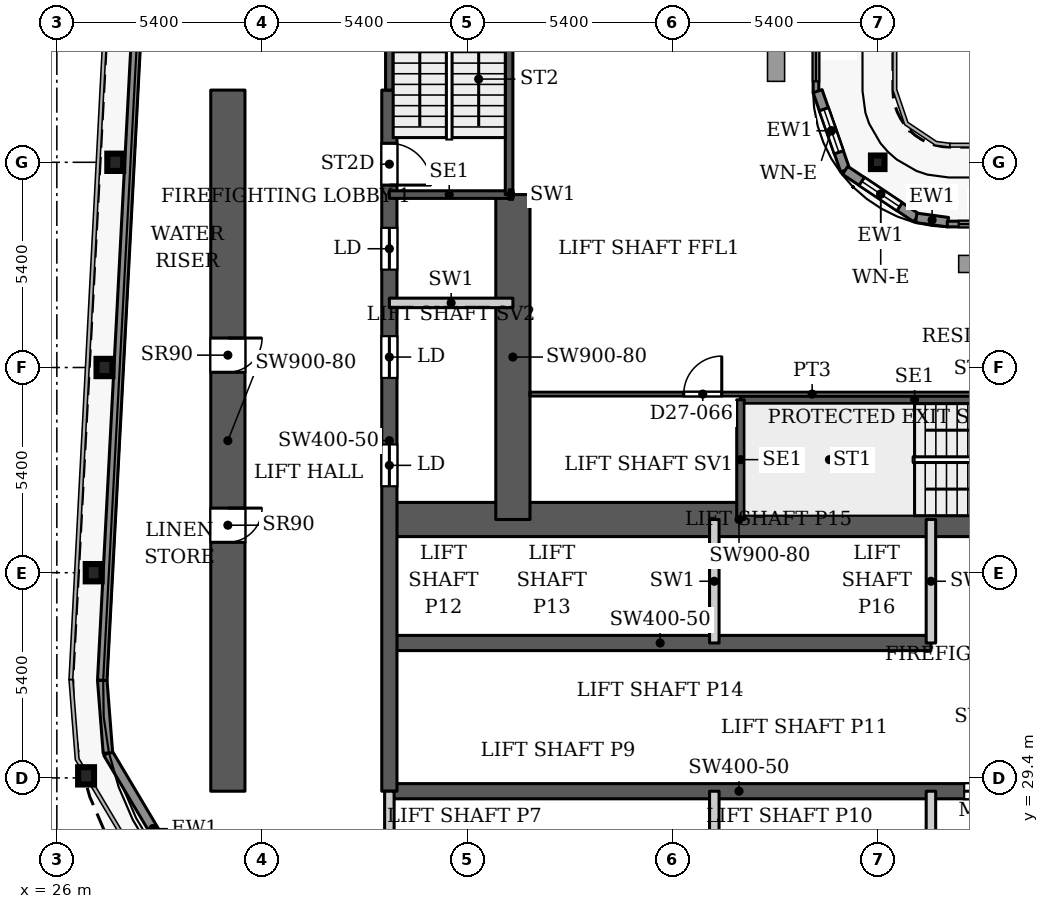
"""IFC4 building model, lengths in metres.
Left out: names, types, materials, properties, quantities, classifications, styles, units other than length and angle.
Written with IfcOpenShell. Run it as: python <this file> out.ifc"""

import sys

from ifc_helpers import new_model, si_unit, direction, frame, frame_2d, origin, origin_2d, place, context, subcontext, project, spatial, rectangle, hollow_rectangle, i_section, extrude, source, transform, mapped, element, fill, save


model = new_model("IFC4")
c1 = context("Model", 3, precision=1e-05, world=origin(), true_north=direction((0.0, 1.0)))
c2 = subcontext(c1, "Body", "Model", "MODEL_VIEW")
j1 = project(units=[si_unit("LENGTHUNIT", "METRE"), si_unit("PLANEANGLEUNIT", "RADIAN")], contexts=[c1])
p1 = place(None, origin())
s1 = spatial("IfcSite", under=j1, at=p1, CompositionType="ELEMENT")
p2 = place(p1, origin())
s2 = spatial("IfcBuilding", under=s1, at=p2, CompositionType="ELEMENT")
p3 = place(p2, frame((0.0, 0.0, 117.5)))
s3 = spatial("IfcBuildingStorey", under=s2, at=p3, CompositionType="ELEMENT", Elevation=117.5)
for number, where, z_axis, x_axis in (
    (1, (26.769, 29.454, 0.0), (0.0, 0.0, 1.0), (1.0, 0.0, 0.0)),
    (2, (26.969, 34.8, 0.0), (0.0, 0.0, 1.0), (1.0, 0.0, 0.0)),
    (3, (27.253, 40.2, 0.0), (0.0, 0.0, 1.0), (1.0, 0.0, 0.0)),
    (4, (27.537, 45.6, 0.0), (0.0, 0.0, 1.0), (1.0, 0.0, 0.0)),
):
    element("IfcColumn", number, at=place(p3, frame(where, z_axis=z_axis, x_axis=x_axis)), inside=s3, PredefinedType="COLUMN", context=c2, shape_type="SweptSolid", body=[
        extrude(i_section(OverallWidth=0.418, OverallDepth=0.455, WebThickness=0.042, FlangeThickness=0.068, FilletRadius=0.014, at=origin_2d()), origin(), (0.0, 0.0, 1.0), 3.9),
    ])
p4 = place(p3, frame((47.6, 45.6, 0.0), z_axis=(0.0, 0.0, 1.0), x_axis=(1.0, 0.0, 0.0)))
e5 = element("IfcColumn", 5, at=p4, inside=s3, PredefinedType="COLUMN", context=c2, shape_type="SweptSolid", body=[
    extrude(hollow_rectangle(XDim=0.356, YDim=0.356, WallThickness=0.016, InnerFilletRadius=0.016, OuterFilletRadius=0.032, at=origin_2d()), origin(), (0.0, 0.0, 1.0), 3.9),
])
p5 = place(p3, frame((34.75, 29.05, 0.0), z_axis=(0.0, 0.0, 1.0), x_axis=(1.0, 0.0, 0.0)))
e6 = element("IfcWall", 6, at=p5, inside=s3, PredefinedType="SHEAR", context=c2, shape_type="SweptSolid", body=[
    extrude(rectangle(XDim=18.4, YDim=0.4, at=frame_2d((9.2, 0.0))), origin(), (0.0, 0.0, 1.0), 3.9),
])
p6 = place(p5, frame((15.125, 0.0, 0.0)))
e7 = element("IfcOpeningElement", 7, at=p6, cuts=e6, PredefinedType="OPENING", context=c2, shape_type="SweptSolid", body=[
    extrude(rectangle(XDim=1.1, YDim=2.2, at=frame_2d((0.55, 1.1))), frame((0.0, 0.21, 0.0), z_axis=(0.0, -1.0, 0.0), x_axis=(1.0, 0.0, 0.0)), (0.0, 0.0, 1.0), 0.42),
])
p7 = place(p3, frame((34.75, 32.95, 0.0), z_axis=(0.0, 0.0, 1.0), x_axis=(1.0, 0.0, 0.0)))
e8 = element("IfcWall", 8, at=p7, inside=s3, PredefinedType="SHEAR", context=c2, shape_type="SweptSolid", body=[
    extrude(rectangle(XDim=14.25, YDim=0.4, at=frame_2d((7.125, 0.0))), origin(), (0.0, 0.0, 1.0), 3.9),
])
p8 = place(p3, frame((34.75, 36.2, 0.0), z_axis=(0.0, 0.0, 1.0), x_axis=(1.0, 0.0, 0.0)))
e9 = element("IfcWall", 9, at=p8, inside=s3, PredefinedType="SHEAR", context=c2, shape_type="SweptSolid", body=[
    extrude(rectangle(XDim=18.4, YDim=0.9, at=frame_2d((9.2, 0.0))), origin(), (0.0, 0.0, 1.0), 3.9),
])
p9 = place(p8, frame((16.9, 0.0, 0.0)))
e10 = element("IfcOpeningElement", 10, at=p9, cuts=e9, PredefinedType="OPENING", context=c2, shape_type="SweptSolid", body=[
    extrude(rectangle(XDim=1.0, YDim=2.2, at=frame_2d((0.5, 1.1))), frame((0.0, 0.46, 0.0), z_axis=(0.0, -1.0, 0.0), x_axis=(1.0, 0.0, 0.0)), (0.0, 0.0, 1.0), 0.92),
])
p10 = place(p3, frame((34.75, 29.05, 0.0), z_axis=(0.0, 0.0, 1.0), x_axis=(0.0, 1.0, 0.0)))
e11 = element("IfcWall", 11, at=p10, inside=s3, PredefinedType="SHEAR", context=c2, shape_type="SweptSolid", body=[
    extrude(rectangle(XDim=18.45, YDim=0.4, at=frame_2d((9.225, 0.0))), origin(), (0.0, 0.0, 1.0), 3.9),
])
p11 = place(p10, frame((8.025, 0.0, 0.0)))
e12 = element("IfcOpeningElement", 12, at=p11, cuts=e11, PredefinedType="OPENING", context=c2, shape_type="SweptSolid", body=[
    extrude(rectangle(XDim=1.1, YDim=2.2, at=frame_2d((0.55, 1.1))), frame((0.0, 0.21, 0.0), z_axis=(0.0, -1.0, 0.0), x_axis=(1.0, 0.0, 0.0)), (0.0, 0.0, 1.0), 0.42),
])
p12 = place(p10, frame((10.875, 0.0, 0.0)))
e13 = element("IfcOpeningElement", 13, at=p12, cuts=e11, PredefinedType="OPENING", context=c2, shape_type="SweptSolid", body=[
    extrude(rectangle(XDim=1.1, YDim=2.2, at=frame_2d((0.55, 1.1))), frame((0.0, 0.21, 0.0), z_axis=(0.0, -1.0, 0.0), x_axis=(1.0, 0.0, 0.0)), (0.0, 0.0, 1.0), 0.42),
])
p13 = place(p10, frame((13.725, 0.0, 0.0)))
e14 = element("IfcOpeningElement", 14, at=p13, cuts=e11, PredefinedType="OPENING", context=c2, shape_type="SweptSolid", body=[
    extrude(rectangle(XDim=1.1, YDim=2.2, at=frame_2d((0.55, 1.1))), frame((0.0, 0.21, 0.0), z_axis=(0.0, -1.0, 0.0), x_axis=(1.0, 0.0, 0.0)), (0.0, 0.0, 1.0), 0.42),
])
p14 = place(p10, frame((15.95, 0.0, 0.0)))
e15 = element("IfcOpeningElement", 15, at=p14, cuts=e11, PredefinedType="OPENING", context=c2, shape_type="SweptSolid", body=[
    extrude(rectangle(XDim=1.1, YDim=2.2, at=frame_2d((0.55, 1.1))), frame((0.0, 0.21, 0.0), z_axis=(0.0, -1.0, 0.0), x_axis=(1.0, 0.0, 0.0)), (0.0, 0.0, 1.0), 0.42),
])
p15 = place(p3, frame((38.0, 36.2, 0.0), z_axis=(0.0, 0.0, 1.0), x_axis=(0.0, 1.0, 0.0)))
e16 = element("IfcWall", 16, at=p15, inside=s3, PredefinedType="SHEAR", context=c2, shape_type="SweptSolid", body=[
    extrude(rectangle(XDim=8.55, YDim=0.9, at=frame_2d((4.275, 0.0))), origin(), (0.0, 0.0, 1.0), 3.9),
])
p16 = place(p3, frame((30.5, 29.05, 0.0), z_axis=(0.0, 0.0, 1.0), x_axis=(0.0, 1.0, 0.0)))
e17 = element("IfcWall", 17, at=p16, inside=s3, PredefinedType="SHEAR", context=c2, shape_type="SweptSolid", body=[
    extrude(rectangle(XDim=18.45, YDim=0.9, at=frame_2d((9.225, 0.0))), origin(), (0.0, 0.0, 1.0), 3.9),
])
p17 = place(p16, frame((6.55, 0.0, 0.0)))
e18 = element("IfcOpeningElement", 18, at=p17, cuts=e17, PredefinedType="OPENING", context=c2, shape_type="SweptSolid", body=[
    extrude(rectangle(XDim=0.9, YDim=2.2, at=frame_2d((0.45, 1.1))), frame((0.0, 0.46, 0.0), z_axis=(0.0, -1.0, 0.0), x_axis=(1.0, 0.0, 0.0)), (0.0, 0.0, 1.0), 0.92),
])
p18 = place(p16, frame((11.025, 0.0, 0.0)))
e19 = element("IfcOpeningElement", 19, at=p18, cuts=e17, PredefinedType="OPENING", context=c2, shape_type="SweptSolid", body=[
    extrude(rectangle(XDim=0.9, YDim=2.2, at=frame_2d((0.45, 1.1))), frame((0.0, 0.46, 0.0), z_axis=(0.0, -1.0, 0.0), x_axis=(1.0, 0.0, 0.0)), (0.0, 0.0, 1.0), 0.92),
])
p19 = place(p3, frame((29.712, 26.072, 0.0), z_axis=(0.0, 0.0, 1.0), x_axis=(-0.511028049012, 0.859564036662, 0.0)))
e20 = element("IfcWall", 20, at=p19, inside=s3, PredefinedType="SOLIDWALL", context=c2, shape_type="SweptSolid", body=[
    extrude(rectangle(XDim=4.634, YDim=0.25, at=frame_2d((2.317, 0.0))), origin(), (0.0, 0.0, 1.0), 3.147),
])
p20 = place(p3, frame((27.344, 30.055, 0.0), z_axis=(0.0, 0.0, 1.0), x_axis=(-0.077571675317, 0.99698677784, 0.0)))
e21 = element("IfcWall", 21, at=p20, inside=s3, PredefinedType="SOLIDWALL", context=c2, shape_type="SweptSolid", body=[
    extrude(rectangle(XDim=1.92, YDim=0.25, at=frame_2d((0.96, 0.0))), origin(), (0.0, 0.0, 1.0), 3.75),
])
p21 = place(p3, frame((27.195, 31.969, 0.0), z_axis=(0.0, 0.0, 1.0), x_axis=(0.052554995867, 0.998618031286, 0.0)))
e22 = element("IfcWall", 22, at=p21, inside=s3, PredefinedType="SOLIDWALL", context=c2, shape_type="SweptSolid", body=[
    extrude(rectangle(XDim=66.787, YDim=0.25, at=frame_2d((33.394, 0.0))), origin(), (0.0, 0.0, 1.0), 3.75),
])
p22 = place(p3, frame((45.975, 49.83, 0.0), z_axis=(0.0, 0.0, 1.0), x_axis=(0.0, -1.0, 0.0)))
e23 = element("IfcWall", 23, at=p22, inside=s3, PredefinedType="SOLIDWALL", context=c2, shape_type="SweptSolid", body=[
    extrude(rectangle(XDim=2.4, YDim=0.15, at=frame_2d((1.2, 0.0))), origin(), (0.0, 0.0, 1.0), 3.75),
])
p23 = place(p22, frame((0.3, 0.0, 0.0)))
e24 = element("IfcOpeningElement", 24, at=p23, cuts=e23, PredefinedType="OPENING", context=c2, shape_type="SweptSolid", body=[
    extrude(rectangle(XDim=1.8, YDim=2.4, at=frame_2d((0.9, 1.2))), frame((0.0, 0.085, 0.0), z_axis=(0.0, -1.0, 0.0), x_axis=(1.0, 0.0, 0.0)), (0.0, 0.0, 1.0), 0.17),
])
p24 = place(p3, frame((46.018, 47.471, 0.0), z_axis=(0.0, 0.0, 1.0), x_axis=(0.328791208903, -0.944402637093, 0.0)))
e25 = element("IfcWall", 25, at=p24, inside=s3, PredefinedType="SOLIDWALL", context=c2, shape_type="SweptSolid", body=[
    extrude(rectangle(XDim=2.205, YDim=0.25, at=frame_2d((1.102, 0.0))), origin(), (0.0, 0.0, 1.0), 3.75),
])
p25 = place(p24, frame((0.503, 0.0, 0.6)))
e26 = element("IfcOpeningElement", 26, at=p25, cuts=e25, PredefinedType="OPENING", context=c2, shape_type="SweptSolid", body=[
    extrude(rectangle(XDim=1.2, YDim=2.1, at=frame_2d((0.6, 1.05))), frame((0.0, 0.135, 0.0), z_axis=(0.0, -1.0, 0.0), x_axis=(1.0, 0.0, 0.0)), (0.0, 0.0, 1.0), 0.27),
])
p26 = place(p3, frame((46.743, 45.389, 0.0), z_axis=(0.0, 0.0, 1.0), x_axis=(0.831449265529, -0.555600682912, 0.0)))
e27 = element("IfcWall", 27, at=p26, inside=s3, PredefinedType="SOLIDWALL", context=c2, shape_type="SweptSolid", body=[
    extrude(rectangle(XDim=2.251, YDim=0.25, at=frame_2d((1.126, 0.0))), origin(), (0.0, 0.0, 1.0), 3.75),
])
p27 = place(p26, frame((0.525, 0.0, 0.6)))
e28 = element("IfcOpeningElement", 28, at=p27, cuts=e27, PredefinedType="OPENING", context=c2, shape_type="SweptSolid", body=[
    extrude(rectangle(XDim=1.2, YDim=2.1, at=frame_2d((0.6, 1.05))), frame((0.0, 0.135, 0.0), z_axis=(0.0, -1.0, 0.0), x_axis=(1.0, 0.0, 0.0)), (0.0, 0.0, 1.0), 0.27),
])
p28 = place(p3, frame((48.615, 44.138, 0.0), z_axis=(0.0, 0.0, 1.0), x_axis=(0.990741504246, -0.135761819977, 0.0)))
e29 = element("IfcWall", 29, at=p28, inside=s3, PredefinedType="SOLIDWALL", context=c2, shape_type="SweptSolid", body=[
    extrude(rectangle(XDim=0.84, YDim=0.25, at=frame_2d((0.42, 0.0))), origin(), (0.0, 0.0, 1.0), 3.75),
])
p29 = place(p3, frame((49.43, 43.975, 0.0), z_axis=(0.0, 0.0, 1.0), x_axis=(1.0, 0.0, 0.0)))
e30 = element("IfcWall", 30, at=p29, inside=s3, PredefinedType="SOLIDWALL", context=c2, shape_type="SweptSolid", body=[
    extrude(rectangle(XDim=2.4, YDim=0.15, at=frame_2d((1.2, 0.0))), origin(), (0.0, 0.0, 1.0), 3.75),
])
p30 = place(p29, frame((0.3, 0.0, 0.0)))
e31 = element("IfcOpeningElement", 31, at=p30, cuts=e30, PredefinedType="OPENING", context=c2, shape_type="SweptSolid", body=[
    extrude(rectangle(XDim=1.8, YDim=2.4, at=frame_2d((0.9, 1.2))), frame((0.0, 0.085, 0.0), z_axis=(0.0, -1.0, 0.0), x_axis=(1.0, 0.0, 0.0)), (0.0, 0.0, 1.0), 0.17),
])
p31 = place(p3, frame((43.99, 39.35, 0.0), z_axis=(0.0, 0.0, 1.0), x_axis=(1.0, 0.0, 0.0)))
e32 = element("IfcWall", 32, at=p31, inside=s3, PredefinedType="SHEAR", context=c2, shape_type="SweptSolid", body=[
    extrude(rectangle(XDim=9.16, YDim=0.2, at=frame_2d((4.58, 0.0))), origin(), (0.0, 0.0, 1.0), 3.9),
])
p32 = place(p3, frame((43.99, 36.2, 0.0), z_axis=(0.0, 0.0, 1.0), x_axis=(0.0, 1.0, 0.0)))
e33 = element("IfcWall", 33, at=p32, inside=s3, PredefinedType="SHEAR", context=c2, shape_type="SweptSolid", body=[
    extrude(rectangle(XDim=3.15, YDim=0.2, at=frame_2d((1.575, 0.0))), origin(), (0.0, 0.0, 1.0), 3.9),
])
p33 = place(p3, frame((34.75, 44.75, 0.0), z_axis=(0.0, 0.0, 1.0), x_axis=(1.0, 0.0, 0.0)))
e34 = element("IfcWall", 34, at=p33, inside=s3, PredefinedType="SHEAR", context=c2, shape_type="SweptSolid", body=[
    extrude(rectangle(XDim=3.15, YDim=0.2, at=frame_2d((1.575, 0.0))), origin(), (0.0, 0.0, 1.0), 3.9),
])
p34 = place(p3, frame((34.75, 47.5, 0.0), z_axis=(0.0, 0.0, 1.0), x_axis=(0.0, 1.0, 0.0)))
e35 = element("IfcWall", 35, at=p34, inside=s3, PredefinedType="SHEAR", context=c2, shape_type="SweptSolid", body=[
    extrude(rectangle(XDim=6.41, YDim=0.2, at=frame_2d((3.205, 0.0))), origin(), (0.0, 0.0, 1.0), 3.9),
])
p35 = place(p3, frame((37.9, 44.75, 0.0), z_axis=(0.0, 0.0, 1.0), x_axis=(0.0, 1.0, 0.0)))
e36 = element("IfcWall", 36, at=p35, inside=s3, PredefinedType="SHEAR", context=c2, shape_type="SweptSolid", body=[
    extrude(rectangle(XDim=9.16, YDim=0.2, at=frame_2d((4.58, 0.0))), origin(), (0.0, 0.0, 1.0), 3.9),
])
for number, where, z_axis, x_axis in (
    (37, (34.75, 25.8, 0.0), (0.0, 0.0, 1.0), (0.0, 1.0, 0.0)),
    (38, (43.3, 25.8, 0.0), (0.0, 0.0, 1.0), (0.0, 1.0, 0.0)),
    (39, (43.3, 32.95, 0.0), (0.0, 0.0, 1.0), (0.0, 1.0, 0.0)),
    (40, (49.0, 25.8, 0.0), (0.0, 0.0, 1.0), (0.0, 1.0, 0.0)),
    (41, (49.0, 32.95, 0.0), (0.0, 0.0, 1.0), (0.0, 1.0, 0.0)),
    (42, (34.75, 41.9, 0.0), (0.0, 0.0, 1.0), (1.0, 0.0, 0.0)),
):
    element("IfcWall", number, at=place(p3, frame(where, z_axis=z_axis, x_axis=x_axis)), inside=s3, PredefinedType="PARTITIONING", context=c2, shape_type="SweptSolid", body=[
        extrude(rectangle(XDim=3.25, YDim=0.25, at=frame_2d((1.625, 0.0))), origin(), (0.0, 0.0, 1.0), 3.9),
    ])
p36 = place(p3, frame((37.9, 44.75, 0.0), z_axis=(0.0, 0.0, 1.0), x_axis=(1.0, 0.0, 0.0)))
e43 = element("IfcWall", 43, at=p36, inside=s3, PredefinedType="PARTITIONING", context=c2, shape_type="SweptSolid", body=[
    extrude(rectangle(XDim=0.1, YDim=0.25, at=frame_2d((0.05, 0.0))), origin(), (0.0, 0.0, 1.0), 3.9),
])
p37 = place(p3, frame((38.449, 39.5, 0.0), z_axis=(0.0, 0.0, 1.0), x_axis=(1.0, 0.0, 0.0)))
e44 = element("IfcWall", 44, at=p37, inside=s3, PredefinedType="PARTITIONING", context=c2, shape_type="SweptSolid", body=[
    extrude(rectangle(XDim=14.851, YDim=0.1, at=frame_2d((7.426, 0.0))), origin(), (0.0, 0.0, 1.0), 3.6),
])
p38 = place(p37, frame((4.047, 0.0, 0.0)))
e45 = element("IfcOpeningElement", 45, at=p38, cuts=e44, PredefinedType="OPENING", context=c2, shape_type="SweptSolid", body=[
    extrude(rectangle(XDim=1.0, YDim=2.1, at=frame_2d((0.5, 1.05))), frame((0.0, 0.06, 0.0), z_axis=(0.0, -1.0, 0.0), x_axis=(1.0, 0.0, 0.0)), (0.0, 0.0, 1.0), 0.12),
])
m1 = source(origin(), c2, "Body", "SweptSolid", [
    extrude(rectangle(XDim=1.8, YDim=2.4, at=frame_2d((0.9, 1.2))), frame((0.0, 0.025, 0.0), z_axis=(0.0, -1.0, 0.0), x_axis=(1.0, 0.0, 0.0)), (0.0, 0.0, 1.0), 0.05),
])
p39 = place(p23, origin())
e46 = element("IfcDoor", 46, at=p39, inside=s3, OperationType="SLIDING_TO_LEFT", PredefinedType="DOOR", context=c2, shape_type="MappedRepresentation", body=[
    mapped(m1, transform((0.0, 0.0, 0.0), x_axis=(1.0, 0.0, 0.0), y_axis=(0.0, 1.0, 0.0), z_axis=(0.0, 0.0, 1.0), scale=1.0)),
])
fill(e24, e46)
m2 = source(origin(), c2, "Body", "SweptSolid", [
    extrude(rectangle(XDim=1.2, YDim=2.1, at=frame_2d((0.6, 1.05))), frame((0.0, 0.03, 0.0), z_axis=(0.0, -1.0, 0.0), x_axis=(1.0, 0.0, 0.0)), (0.0, 0.0, 1.0), 0.06),
])
p40 = place(p25, origin())
e47 = element("IfcWindow", 47, at=p40, inside=s3, PartitioningType="SINGLE_PANEL", PredefinedType="WINDOW", context=c2, shape_type="MappedRepresentation", body=[
    mapped(m2, transform((0.0, 0.0, 0.0), x_axis=(1.0, 0.0, 0.0), y_axis=(0.0, 1.0, 0.0), z_axis=(0.0, 0.0, 1.0), scale=1.0)),
])
fill(e26, e47)
p41 = place(p27, origin())
e48 = element("IfcWindow", 48, at=p41, inside=s3, PartitioningType="SINGLE_PANEL", PredefinedType="WINDOW", context=c2, shape_type="MappedRepresentation", body=[
    mapped(m2, transform((0.0, 0.0, 0.0), x_axis=(1.0, 0.0, 0.0), y_axis=(0.0, 1.0, 0.0), z_axis=(0.0, 0.0, 1.0), scale=1.0)),
])
fill(e28, e48)
p42 = place(p30, origin())
e49 = element("IfcDoor", 49, at=p42, inside=s3, OperationType="SLIDING_TO_LEFT", PredefinedType="DOOR", context=c2, shape_type="MappedRepresentation", body=[
    mapped(m1, transform((0.0, 0.0, 0.0), x_axis=(1.0, 0.0, 0.0), y_axis=(0.0, 1.0, 0.0), z_axis=(0.0, 0.0, 1.0), scale=1.0)),
])
fill(e31, e49)
m3 = source(origin(), c2, "Body", "SweptSolid", [
    extrude(rectangle(XDim=1.1, YDim=2.2, at=frame_2d((0.55, 1.1))), frame((0.0, 0.025, 0.0), z_axis=(0.0, -1.0, 0.0), x_axis=(1.0, 0.0, 0.0)), (0.0, 0.0, 1.0), 0.05),
])
p43 = place(p11, origin())
e50 = element("IfcDoor", 50, at=p43, inside=s3, OperationType="SLIDING_TO_LEFT", PredefinedType="DOOR", context=c2, shape_type="MappedRepresentation", body=[
    mapped(m3, transform((0.0, 0.0, 0.0), x_axis=(1.0, 0.0, 0.0), y_axis=(0.0, 1.0, 0.0), z_axis=(0.0, 0.0, 1.0), scale=1.0)),
])
fill(e12, e50)
p44 = place(p12, origin())
e51 = element("IfcDoor", 51, at=p44, inside=s3, OperationType="SLIDING_TO_LEFT", PredefinedType="DOOR", context=c2, shape_type="MappedRepresentation", body=[
    mapped(m3, transform((0.0, 0.0, 0.0), x_axis=(1.0, 0.0, 0.0), y_axis=(0.0, 1.0, 0.0), z_axis=(0.0, 0.0, 1.0), scale=1.0)),
])
fill(e13, e51)
p45 = place(p13, origin())
e52 = element("IfcDoor", 52, at=p45, inside=s3, OperationType="SLIDING_TO_LEFT", PredefinedType="DOOR", context=c2, shape_type="MappedRepresentation", body=[
    mapped(m3, transform((0.0, 0.0, 0.0), x_axis=(1.0, 0.0, 0.0), y_axis=(0.0, 1.0, 0.0), z_axis=(0.0, 0.0, 1.0), scale=1.0)),
])
fill(e14, e52)
p46 = place(p6, origin())
e53 = element("IfcDoor", 53, at=p46, inside=s3, OperationType="SLIDING_TO_LEFT", PredefinedType="DOOR", context=c2, shape_type="MappedRepresentation", body=[
    mapped(m3, transform((0.0, 0.0, 0.0), x_axis=(1.0, 0.0, 0.0), y_axis=(0.0, 1.0, 0.0), z_axis=(0.0, 0.0, 1.0), scale=1.0)),
])
fill(e7, e53)
m4 = source(origin(), c2, "Body", "SweptSolid", [
    extrude(rectangle(XDim=0.9, YDim=2.2, at=frame_2d((0.45, 1.1))), frame((0.0, 0.025, 0.0), z_axis=(0.0, -1.0, 0.0), x_axis=(1.0, 0.0, 0.0)), (0.0, 0.0, 1.0), 0.05),
])
p47 = place(p17, origin())
e54 = element("IfcDoor", 54, at=p47, inside=s3, OperationType="SINGLE_SWING_RIGHT", PredefinedType="DOOR", context=c2, shape_type="MappedRepresentation", body=[
    mapped(m4, transform((0.0, 0.0, 0.0), x_axis=(1.0, 0.0, 0.0), y_axis=(0.0, 1.0, 0.0), z_axis=(0.0, 0.0, 1.0), scale=1.0)),
])
fill(e18, e54)
p48 = place(p18, origin())
e55 = element("IfcDoor", 55, at=p48, inside=s3, OperationType="SINGLE_SWING_RIGHT", PredefinedType="DOOR", context=c2, shape_type="MappedRepresentation", body=[
    mapped(m4, transform((0.0, 0.0, 0.0), x_axis=(1.0, 0.0, 0.0), y_axis=(0.0, 1.0, 0.0), z_axis=(0.0, 0.0, 1.0), scale=1.0)),
])
fill(e19, e55)
m5 = source(origin(), c2, "Body", "SweptSolid", [
    extrude(rectangle(XDim=1.1, YDim=2.2, at=frame_2d((0.55, 1.1))), frame((0.0, 0.025, 0.0), z_axis=(0.0, -1.0, 0.0), x_axis=(1.0, 0.0, 0.0)), (0.0, 0.0, 1.0), 0.05),
])
p49 = place(p14, origin())
e56 = element("IfcDoor", 56, at=p49, inside=s3, OperationType="SINGLE_SWING_RIGHT", PredefinedType="DOOR", context=c2, shape_type="MappedRepresentation", body=[
    mapped(m5, transform((0.0, 0.0, 0.0), x_axis=(1.0, 0.0, 0.0), y_axis=(0.0, 1.0, 0.0), z_axis=(0.0, 0.0, 1.0), scale=1.0)),
])
fill(e15, e56)
m6 = source(origin(), c2, "Body", "SweptSolid", [
    extrude(rectangle(XDim=1.0, YDim=2.1, at=frame_2d((0.5, 1.05))), frame((0.0, 0.025, 0.0), z_axis=(0.0, -1.0, 0.0), x_axis=(1.0, 0.0, 0.0)), (0.0, 0.0, 1.0), 0.05),
])
p50 = place(p38, origin())
e57 = element("IfcDoor", 57, at=p50, inside=s3, OperationType="SINGLE_SWING_LEFT", PredefinedType="DOOR", context=c2, shape_type="MappedRepresentation", body=[
    mapped(m6, transform((0.0, 0.0, 0.0), x_axis=(1.0, 0.0, 0.0), y_axis=(0.0, 1.0, 0.0), z_axis=(0.0, 0.0, 1.0), scale=1.0)),
])
fill(e45, e57)
save(model, sys.argv[1])
